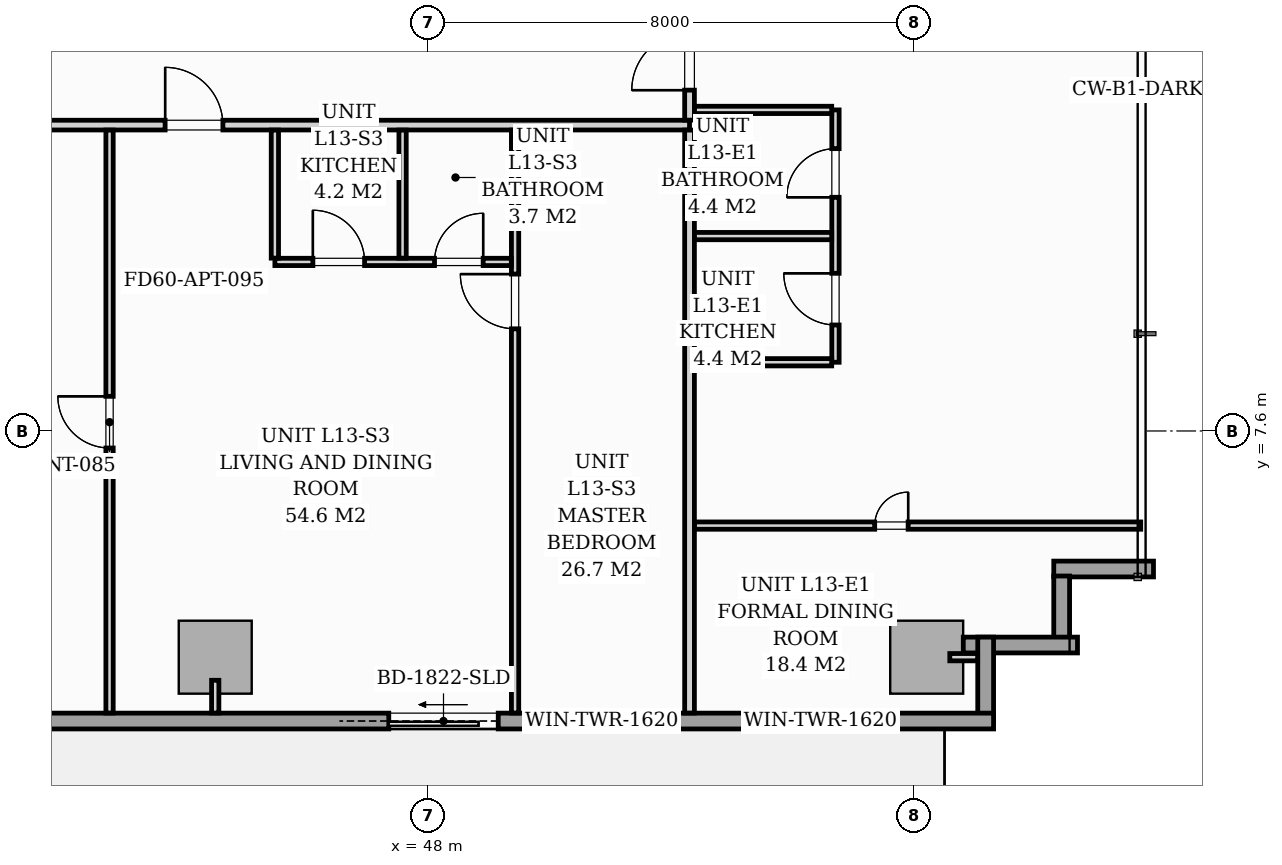
"""IFC4 building model, lengths in metres.
Left out: names, types, materials, properties, quantities, classifications, styles, units other than length and angle.
Written with IfcOpenShell. Run it as: python <this file> out.ifc"""

import sys

from ifc_helpers import new_model, si_unit, direction, frame, frame_2d, origin, origin_2d, place, context, subcontext, project, spatial, rectangle, extrude, source, transform, mapped, element, fill, save


model = new_model("IFC4")
c1 = context("Model", 3, precision=1e-05, world=origin(), true_north=direction((0.0, 1.0)))
c2 = subcontext(c1, "Body", "Model", "MODEL_VIEW")
j1 = project(units=[si_unit("LENGTHUNIT", "METRE"), si_unit("PLANEANGLEUNIT", "RADIAN")], contexts=[c1])
p1 = place(None, origin())
s1 = spatial("IfcSite", under=j1, at=p1, CompositionType="ELEMENT")
p2 = place(p1, origin())
s2 = spatial("IfcBuilding", under=s1, at=p2, CompositionType="ELEMENT")
p3 = place(p2, frame((0.0, 0.0, 48.6)))
s3 = spatial("IfcBuildingStorey", under=s2, at=p3, CompositionType="ELEMENT", Elevation=48.6)
m1 = source(origin(), c2, "Body", "SweptSolid", [
    extrude(rectangle(XDim=1.2, YDim=1.2, at=origin_2d()), origin(), (0.0, 0.0, 1.0), 3.196),
])
for number, where, z_axis, x_axis in (
    (1, (44.5, 3.88, 0.002), (0.0, 0.0, 1.0), (1.0, 0.0, 0.0)),
    (2, (56.2, 3.88, 0.002), (0.0, 0.0, 1.0), (1.0, 0.0, 0.0)),
):
    element("IfcColumn", number, at=place(p3, frame(where, z_axis=z_axis, x_axis=x_axis)), inside=s3, PredefinedType="COLUMN", context=c2, shape_type="MappedRepresentation", body=[
        mapped(m1, transform((0.0, 0.0, 0.0), scale=1.0)),
    ])
p4 = place(p3, frame((59.93, 5.33, 0.0), z_axis=(0.0, 0.0, 1.0), x_axis=(-1.0, 0.0, 0.0)))
e3 = element("IfcWall", 3, at=p4, inside=s3, PredefinedType="STANDARD", context=c2, shape_type="SweptSolid", body=[
    extrude(rectangle(XDim=1.64, YDim=0.26, at=frame_2d((0.82, 0.0))), origin(), (0.0, 0.0, 1.0), 2.94),
])
p5 = place(p3, frame((58.42, 5.215, 0.0), z_axis=(0.0, 0.0, 1.0), x_axis=(0.0, -1.0, 0.0)))
e4 = element("IfcWall", 4, at=p5, inside=s3, PredefinedType="STANDARD", context=c2, shape_type="SweptSolid", body=[
    extrude(rectangle(XDim=1.15, YDim=0.26, at=frame_2d((0.575, 0.0))), origin(), (0.0, 0.0, 1.0), 2.94),
])
p6 = place(p3, frame((58.68, 4.08, 0.0), z_axis=(0.0, 0.0, 1.0), x_axis=(-1.0, 0.0, 0.0)))
e5 = element("IfcWall", 5, at=p6, inside=s3, PredefinedType="STANDARD", context=c2, shape_type="SweptSolid", body=[
    extrude(rectangle(XDim=1.878, YDim=0.26, at=frame_2d((0.939, 0.0))), origin(), (0.0, 0.0, 1.0), 2.94),
])
p7 = place(p3, frame((57.17, 4.21, 0.0), z_axis=(0.0, 0.0, 1.0), x_axis=(0.0, -1.0, 0.0)))
e6 = element("IfcWall", 6, at=p7, inside=s3, PredefinedType="STANDARD", context=c2, shape_type="SweptSolid", body=[
    extrude(rectangle(XDim=1.395, YDim=0.26, at=frame_2d((0.698, 0.0))), origin(), (0.0, 0.0, 1.0), 2.94),
])
p8 = place(p3, frame((57.3, 2.83, 0.0), z_axis=(0.0, 0.0, 1.0), x_axis=(-1.0, 0.0, 0.0)))
e7 = element("IfcWall", 7, at=p8, inside=s3, PredefinedType="STANDARD", context=c2, shape_type="SweptSolid", body=[
    extrude(rectangle(XDim=17.15, YDim=0.26, at=frame_2d((8.575, 0.0))), origin(), (0.0, 0.0, 1.0), 2.94),
])
p9 = place(p8, frame((8.146, 0.0, 0.0)))
e8 = element("IfcOpeningElement", 8, at=p9, cuts=e7, PredefinedType="OPENING", context=c2, shape_type="SweptSolid", body=[
    extrude(rectangle(XDim=1.8, YDim=2.06, at=frame_2d((0.9, 1.03))), frame((0.0, 0.14, 0.0), z_axis=(0.0, -1.0, 0.0), x_axis=(1.0, 0.0, 0.0)), (0.0, 0.0, 1.0), 0.28),
])
p10 = place(p8, frame((2.05, 0.0, 0.65)))
e9 = element("IfcOpeningElement", 9, at=p10, cuts=e7, PredefinedType="OPENING", context=c2, shape_type="SweptSolid", body=[
    extrude(rectangle(XDim=1.6, YDim=1.5, at=frame_2d((0.8, 0.75))), frame((0.0, 0.14, 0.0), z_axis=(0.0, -1.0, 0.0), x_axis=(1.0, 0.0, 0.0)), (0.0, 0.0, 1.0), 0.28),
])
p11 = place(p8, frame((5.644, 0.0, 0.75)))
e10 = element("IfcOpeningElement", 10, at=p11, cuts=e7, PredefinedType="OPENING", context=c2, shape_type="SweptSolid", body=[
    extrude(rectangle(XDim=1.6, YDim=1.5, at=frame_2d((0.8, 0.75))), frame((0.0, 0.14, 0.0), z_axis=(0.0, -1.0, 0.0), x_axis=(1.0, 0.0, 0.0)), (0.0, 0.0, 1.0), 0.28),
])
p12 = place(p3, frame((15.2, 12.63, 0.0), z_axis=(0.0, 0.0, 1.0), x_axis=(1.0, 0.0, 0.0)))
e11 = element("IfcWall", 11, at=p12, inside=s3, PredefinedType="PARTITIONING", context=c2, shape_type="SweptSolid", body=[
    extrude(rectangle(XDim=37.1, YDim=0.16, at=frame_2d((18.55, 0.0))), origin(), (0.0, 0.0, 1.0), 2.94),
])
p13 = place(p12, frame((1.572, 0.0, 0.0)))
e12 = element("IfcOpeningElement", 12, at=p13, cuts=e11, PredefinedType="OPENING", context=c2, shape_type="SweptSolid", body=[
    extrude(rectangle(XDim=0.95, YDim=2.06, at=frame_2d((0.475, 1.03))), frame((0.0, 0.09, 0.0), z_axis=(0.0, -1.0, 0.0), x_axis=(1.0, 0.0, 0.0)), (0.0, 0.0, 1.0), 0.18),
])
p14 = place(p12, frame((14.877, 0.0, 0.0)))
e13 = element("IfcOpeningElement", 13, at=p14, cuts=e11, PredefinedType="OPENING", context=c2, shape_type="SweptSolid", body=[
    extrude(rectangle(XDim=0.95, YDim=2.06, at=frame_2d((0.475, 1.03))), frame((0.0, 0.09, 0.0), z_axis=(0.0, -1.0, 0.0), x_axis=(1.0, 0.0, 0.0)), (0.0, 0.0, 1.0), 0.18),
])
p15 = place(p12, frame((28.476, 0.0, 0.0)))
e14 = element("IfcOpeningElement", 14, at=p15, cuts=e11, PredefinedType="OPENING", context=c2, shape_type="SweptSolid", body=[
    extrude(rectangle(XDim=0.95, YDim=2.06, at=frame_2d((0.475, 1.03))), frame((0.0, 0.09, 0.0), z_axis=(0.0, -1.0, 0.0), x_axis=(1.0, 0.0, 0.0)), (0.0, 0.0, 1.0), 0.18),
])
p16 = place(p3, frame((52.3, 2.962, 0.0), z_axis=(0.0, 0.0, 1.0), x_axis=(0.0, 1.0, 0.0)))
e15 = element("IfcWall", 15, at=p16, inside=s3, PredefinedType="PARTITIONING", context=c2, shape_type="SweptSolid", body=[
    extrude(rectangle(XDim=9.586, YDim=0.16, at=frame_2d((4.793, 0.0))), origin(), (0.0, 0.0, 1.0), 2.94),
])
p17 = place(p3, frame((52.3, 12.712, 0.0), z_axis=(0.0, 0.0, 1.0), x_axis=(0.0, 1.0, 0.0)))
e16 = element("IfcWall", 16, at=p17, inside=s3, PredefinedType="PARTITIONING", context=c2, shape_type="SweptSolid", body=[
    extrude(rectangle(XDim=14.726, YDim=0.16, at=frame_2d((7.363, 0.0))), origin(), (0.0, 0.0, 1.0), 2.94),
])
p18 = place(p17, frame((0.493, 0.0, 0.0)))
e17 = element("IfcOpeningElement", 17, at=p18, cuts=e16, PredefinedType="OPENING", context=c2, shape_type="SweptSolid", body=[
    extrude(rectangle(XDim=0.95, YDim=2.06, at=frame_2d((0.475, 1.03))), frame((0.0, 0.09, 0.0), z_axis=(0.0, -1.0, 0.0), x_axis=(1.0, 0.0, 0.0)), (0.0, 0.0, 1.0), 0.18),
])
p19 = place(p17, frame((5.433, 0.0, 0.0)))
e18 = element("IfcOpeningElement", 18, at=p19, cuts=e16, PredefinedType="OPENING", context=c2, shape_type="SweptSolid", body=[
    extrude(rectangle(XDim=0.95, YDim=2.06, at=frame_2d((0.475, 1.03))), frame((0.0, 0.09, 0.0), z_axis=(0.0, -1.0, 0.0), x_axis=(1.0, 0.0, 0.0)), (0.0, 0.0, 1.0), 0.18),
])
p20 = place(p3, frame((49.431, 2.962, 0.0), z_axis=(0.0, 0.0, 1.0), x_axis=(0.0, 1.0, 0.0)))
e19 = element("IfcWall", 19, at=p20, inside=s3, PredefinedType="PARTITIONING", context=c2, shape_type="SweptSolid", body=[
    extrude(rectangle(XDim=9.586, YDim=0.12, at=frame_2d((4.793, 0.0))), origin(), (0.0, 0.0, 1.0), 2.94),
])
p21 = place(p20, frame((6.318, 0.0, 0.0)))
e20 = element("IfcOpeningElement", 20, at=p21, cuts=e19, PredefinedType="OPENING", context=c2, shape_type="SweptSolid", body=[
    extrude(rectangle(XDim=0.9, YDim=2.05, at=frame_2d((0.45, 1.025))), frame((0.0, 0.07, 0.0), z_axis=(0.0, -1.0, 0.0), x_axis=(1.0, 0.0, 0.0)), (0.0, 0.0, 1.0), 0.14),
])
p22 = place(p3, frame((45.481, 10.38, 0.0), z_axis=(0.0, 0.0, 1.0), x_axis=(1.0, 0.0, 0.0)))
e21 = element("IfcWall", 21, at=p22, inside=s3, PredefinedType="PARTITIONING", context=c2, shape_type="SweptSolid", body=[
    extrude(rectangle(XDim=3.888, YDim=0.12, at=frame_2d((1.944, 0.0))), origin(), (0.0, 0.0, 1.0), 2.94),
])
p23 = place(p22, frame((0.625, 0.0, 0.0)))
e22 = element("IfcOpeningElement", 22, at=p23, cuts=e21, PredefinedType="OPENING", context=c2, shape_type="SweptSolid", body=[
    extrude(rectangle(XDim=0.85, YDim=2.05, at=frame_2d((0.425, 1.025))), frame((0.0, 0.07, 0.0), z_axis=(0.0, -1.0, 0.0), x_axis=(1.0, 0.0, 0.0)), (0.0, 0.0, 1.0), 0.14),
])
p24 = place(p22, frame((2.625, 0.0, 0.0)))
e23 = element("IfcOpeningElement", 23, at=p24, cuts=e21, PredefinedType="OPENING", context=c2, shape_type="SweptSolid", body=[
    extrude(rectangle(XDim=0.8, YDim=2.02, at=frame_2d((0.4, 1.01))), frame((0.0, 0.07, 0.0), z_axis=(0.0, -1.0, 0.0), x_axis=(1.0, 0.0, 0.0)), (0.0, 0.0, 1.0), 0.14),
])
for number, where, z_axis, x_axis in (
    (24, (47.581, 10.442, 0.0), (0.0, 0.0, 1.0), (0.0, 1.0, 0.0)),
    (25, (45.481, 10.442, 0.0), (0.0, 0.0, 1.0), (0.0, 1.0, 0.0)),
):
    element("IfcWall", number, at=place(p3, frame(where, z_axis=z_axis, x_axis=x_axis)), inside=s3, PredefinedType="PARTITIONING", context=c2, shape_type="SweptSolid", body=[
        extrude(rectangle(XDim=2.106, YDim=0.12, at=frame_2d((1.053, 0.0))), origin(), (0.0, 0.0, 1.0), 2.94),
    ])
p25 = place(p3, frame((42.762, 2.962, 0.0), z_axis=(0.0, 0.0, 1.0), x_axis=(0.0, 1.0, 0.0)))
e26 = element("IfcWall", 26, at=p25, inside=s3, PredefinedType="PARTITIONING", context=c2, shape_type="SweptSolid", body=[
    extrude(rectangle(XDim=9.586, YDim=0.12, at=frame_2d((4.793, 0.0))), origin(), (0.0, 0.0, 1.0), 2.94),
])
p26 = place(p25, frame((4.358, 0.0, 0.0)))
e27 = element("IfcOpeningElement", 27, at=p26, cuts=e26, PredefinedType="OPENING", context=c2, shape_type="SweptSolid", body=[
    extrude(rectangle(XDim=0.85, YDim=2.05, at=frame_2d((0.425, 1.025))), frame((0.0, 0.07, 0.0), z_axis=(0.0, -1.0, 0.0), x_axis=(1.0, 0.0, 0.0)), (0.0, 0.0, 1.0), 0.14),
])
p27 = place(p3, frame((54.7, 8.73, 0.0), z_axis=(0.0, 0.0, 1.0), x_axis=(0.0, 1.0, 0.0)))
e28 = element("IfcWall", 28, at=p27, inside=s3, PredefinedType="PARTITIONING", context=c2, shape_type="SweptSolid", body=[
    extrude(rectangle(XDim=4.15, YDim=0.12, at=frame_2d((2.075, 0.0))), origin(), (0.0, 0.0, 1.0), 2.94),
])
p28 = place(p27, frame((0.613, 0.0, 0.0)))
e29 = element("IfcOpeningElement", 29, at=p28, cuts=e28, PredefinedType="OPENING", context=c2, shape_type="SweptSolid", body=[
    extrude(rectangle(XDim=0.85, YDim=2.05, at=frame_2d((0.425, 1.025))), frame((0.0, 0.07, 0.0), z_axis=(0.0, -1.0, 0.0), x_axis=(1.0, 0.0, 0.0)), (0.0, 0.0, 1.0), 0.14),
])
p29 = place(p27, frame((2.713, 0.0, 0.0)))
e30 = element("IfcOpeningElement", 30, at=p29, cuts=e28, PredefinedType="OPENING", context=c2, shape_type="SweptSolid", body=[
    extrude(rectangle(XDim=0.8, YDim=2.02, at=frame_2d((0.4, 1.01))), frame((0.0, 0.07, 0.0), z_axis=(0.0, -1.0, 0.0), x_axis=(1.0, 0.0, 0.0)), (0.0, 0.0, 1.0), 0.14),
])
for number, where, z_axis, x_axis in (
    (31, (52.382, 10.805, 0.0), (0.0, 0.0, 1.0), (1.0, 0.0, 0.0)),
    (32, (52.382, 8.73, 0.0), (0.0, 0.0, 1.0), (1.0, 0.0, 0.0)),
    (33, (52.382, 12.88, 0.0), (0.0, 0.0, 1.0), (1.0, 0.0, 0.0)),
):
    element("IfcWall", number, at=place(p3, frame(where, z_axis=z_axis, x_axis=x_axis)), inside=s3, PredefinedType="PARTITIONING", context=c2, shape_type="SweptSolid", body=[
        extrude(rectangle(XDim=2.256, YDim=0.12, at=frame_2d((1.128, 0.0))), origin(), (0.0, 0.0, 1.0), 2.94),
    ])
p30 = place(p3, frame((52.382, 6.044, 0.0), z_axis=(0.0, 0.0, 1.0), x_axis=(1.0, 0.0, 0.0)))
e34 = element("IfcWall", 34, at=p30, inside=s3, PredefinedType="PARTITIONING", context=c2, shape_type="SweptSolid", body=[
    extrude(rectangle(XDim=7.338, YDim=0.12, at=frame_2d((3.669, 0.0))), origin(), (0.0, 0.0, 1.0), 2.94),
])
p31 = place(p30, frame((2.963, 0.0, 0.0)))
e35 = element("IfcOpeningElement", 35, at=p31, cuts=e34, PredefinedType="OPENING", context=c2, shape_type="SweptSolid", body=[
    extrude(rectangle(XDim=0.55, YDim=2.0, at=frame_2d((0.275, 1.0))), frame((0.0, 0.07, 0.0), z_axis=(0.0, -1.0, 0.0), x_axis=(1.0, 0.0, 0.0)), (0.0, 0.0, 1.0), 0.14),
])
p32 = place(p3, frame((44.5, 3.5, 0.0), z_axis=(0.0, 0.0, 1.0), x_axis=(0.0, -1.0, 0.0)))
e36 = element("IfcWall", 36, at=p32, inside=s3, PredefinedType="PARTITIONING", context=c2, shape_type="SweptSolid", body=[
    extrude(rectangle(XDim=0.538, YDim=0.12, at=frame_2d((0.269, 0.0))), origin(), (0.0, 0.0, 1.0), 2.94),
])
p33 = place(p3, frame((56.58, 3.88, 0.0), z_axis=(0.0, 0.0, 1.0), x_axis=(1.0, 0.0, 0.0)))
e37 = element("IfcWall", 37, at=p33, inside=s3, PredefinedType="PARTITIONING", context=c2, shape_type="SweptSolid", body=[
    extrude(rectangle(XDim=0.458, YDim=0.12, at=frame_2d((0.229, 0.0))), origin(), (0.0, 0.0, 1.0), 2.94),
])
m2 = source(origin(), c2, "Body", "SweptSolid", [
    extrude(rectangle(XDim=1.8, YDim=2.06, at=frame_2d((0.9, 1.03))), frame((0.0, 0.025, 0.0), z_axis=(0.0, -1.0, 0.0), x_axis=(1.0, 0.0, 0.0)), (0.0, 0.0, 1.0), 0.05),
])
p34 = place(p9, origin())
e38 = element("IfcDoor", 38, at=p34, inside=s3, OperationType="SLIDING_TO_RIGHT", PredefinedType="DOOR", context=c2, shape_type="MappedRepresentation", body=[
    mapped(m2, transform((0.0, 0.0, 0.0), scale=1.0)),
])
fill(e8, e38)
m3 = source(origin(), c2, "Body", "SweptSolid", [
    extrude(rectangle(XDim=1.6, YDim=1.5, at=frame_2d((0.8, 0.75))), frame((0.0, 0.03, 0.0), z_axis=(0.0, -1.0, 0.0), x_axis=(1.0, 0.0, 0.0)), (0.0, 0.0, 1.0), 0.06),
])
p35 = place(p10, origin())
e39 = element("IfcWindow", 39, at=p35, inside=s3, PartitioningType="SINGLE_PANEL", PredefinedType="WINDOW", context=c2, shape_type="MappedRepresentation", body=[
    mapped(m3, transform((0.0, 0.0, 0.0), scale=1.0)),
])
fill(e9, e39)
p36 = place(p11, origin())
e40 = element("IfcWindow", 40, at=p36, inside=s3, PartitioningType="SINGLE_PANEL", PredefinedType="WINDOW", context=c2, shape_type="MappedRepresentation", body=[
    mapped(m3, transform((0.0, 0.0, 0.0), scale=1.0)),
])
fill(e10, e40)
m4 = source(origin(), c2, "Body", "SweptSolid", [
    extrude(rectangle(XDim=0.85, YDim=2.05, at=frame_2d((0.425, 1.025))), frame((0.0, 0.025, 0.0), z_axis=(0.0, -1.0, 0.0), x_axis=(1.0, 0.0, 0.0)), (0.0, 0.0, 1.0), 0.05),
])
p37 = place(p26, origin())
e41 = element("IfcDoor", 41, at=p37, inside=s3, OperationType="SINGLE_SWING_RIGHT", PredefinedType="DOOR", context=c2, shape_type="MappedRepresentation", body=[
    mapped(m4, transform((0.0, 0.0, 0.0), scale=1.0)),
])
fill(e27, e41)
m5 = source(origin(), c2, "Body", "SweptSolid", [
    extrude(rectangle(XDim=0.95, YDim=2.06, at=frame_2d((0.475, 1.03))), frame((0.0, 0.025, 0.0), z_axis=(0.0, -1.0, 0.0), x_axis=(1.0, 0.0, 0.0)), (0.0, 0.0, 1.0), 0.05),
])
p38 = place(p15, origin())
e42 = element("IfcDoor", 42, at=p38, inside=s3, OperationType="SINGLE_SWING_LEFT", PredefinedType="DOOR", context=c2, shape_type="MappedRepresentation", body=[
    mapped(m5, transform((0.0, 0.0, 0.0), scale=1.0)),
])
fill(e14, e42)
m6 = source(origin(), c2, "Body", "SweptSolid", [
    extrude(rectangle(XDim=0.9, YDim=2.05, at=frame_2d((0.45, 1.025))), frame((0.0, 0.025, 0.0), z_axis=(0.0, -1.0, 0.0), x_axis=(1.0, 0.0, 0.0)), (0.0, 0.0, 1.0), 0.05),
])
p39 = place(p21, origin())
e43 = element("IfcDoor", 43, at=p39, inside=s3, OperationType="SINGLE_SWING_RIGHT", PredefinedType="DOOR", context=c2, shape_type="MappedRepresentation", body=[
    mapped(m6, transform((0.0, 0.0, 0.0), scale=1.0)),
])
fill(e20, e43)
p40 = place(p23, origin())
e44 = element("IfcDoor", 44, at=p40, inside=s3, OperationType="SINGLE_SWING_LEFT", PredefinedType="DOOR", context=c2, shape_type="MappedRepresentation", body=[
    mapped(m4, transform((0.0, 0.0, 0.0), scale=1.0)),
])
fill(e22, e44)
m7 = source(origin(), c2, "Body", "SweptSolid", [
    extrude(rectangle(XDim=0.8, YDim=2.02, at=frame_2d((0.4, 1.01))), frame((0.0, 0.025, 0.0), z_axis=(0.0, -1.0, 0.0), x_axis=(1.0, 0.0, 0.0)), (0.0, 0.0, 1.0), 0.05),
])
p41 = place(p24, origin())
e45 = element("IfcDoor", 45, at=p41, inside=s3, OperationType="SINGLE_SWING_RIGHT", PredefinedType="DOOR", context=c2, shape_type="MappedRepresentation", body=[
    mapped(m7, transform((0.0, 0.0, 0.0), scale=1.0)),
])
fill(e23, e45)
p42 = place(p18, origin())
e46 = element("IfcDoor", 46, at=p42, inside=s3, OperationType="SINGLE_SWING_LEFT", PredefinedType="DOOR", context=c2, shape_type="MappedRepresentation", body=[
    mapped(m5, transform((0.0, 0.0, 0.0), scale=1.0)),
])
fill(e17, e46)
p43 = place(p28, origin())
e47 = element("IfcDoor", 47, at=p43, inside=s3, OperationType="SINGLE_SWING_RIGHT", PredefinedType="DOOR", context=c2, shape_type="MappedRepresentation", body=[
    mapped(m4, transform((0.0, 0.0, 0.0), scale=1.0)),
])
fill(e29, e47)
p44 = place(p29, origin())
e48 = element("IfcDoor", 48, at=p44, inside=s3, OperationType="SINGLE_SWING_LEFT", PredefinedType="DOOR", context=c2, shape_type="MappedRepresentation", body=[
    mapped(m7, transform((0.0, 0.0, 0.0), scale=1.0)),
])
fill(e30, e48)
m8 = source(origin(), c2, "Body", "SweptSolid", [
    extrude(rectangle(XDim=0.55, YDim=2.0, at=frame_2d((0.275, 1.0))), frame((0.0, 0.025, 0.0), z_axis=(0.0, -1.0, 0.0), x_axis=(1.0, 0.0, 0.0)), (0.0, 0.0, 1.0), 0.05),
])
p45 = place(p31, origin())
e49 = element("IfcDoor", 49, at=p45, inside=s3, OperationType="SINGLE_SWING_RIGHT", PredefinedType="DOOR", context=c2, shape_type="MappedRepresentation", body=[
    mapped(m8, transform((0.0, 0.0, 0.0), scale=1.0)),
])
fill(e35, e49)
save(model, sys.argv[1])
